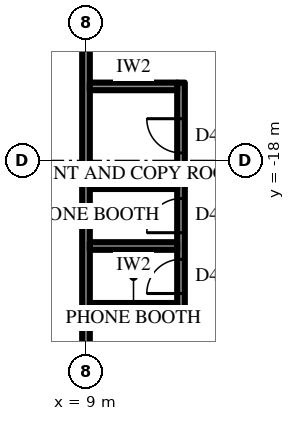
"""IFC4 building model, lengths in metres.
Left out: names, types, materials, properties, quantities, classifications, styles, units other than length and angle.
Written with IfcOpenShell. Run it as: python <this file> out.ifc"""

import sys

from ifc_helpers import new_model, si_unit, direction, frame, frame_2d, origin, place, context, subcontext, project, spatial, rectangle, extrude, element, fill, save


model = new_model("IFC4")
c1 = context("Model", 3, precision=1e-05, world=origin(), true_north=direction((0.0, 1.0)))
c2 = subcontext(c1, "Body", "Model", "MODEL_VIEW")
j1 = project(units=[si_unit("LENGTHUNIT", "METRE"), si_unit("PLANEANGLEUNIT", "RADIAN")], contexts=[c1])
p1 = place(None, origin())
s1 = spatial("IfcSite", under=j1, at=p1, CompositionType="ELEMENT")
p2 = place(p1, origin())
s2 = spatial("IfcBuilding", under=s1, at=p2, CompositionType="ELEMENT")
p3 = place(p2, frame((0.0, 0.0, 161.5)))
s3 = spatial("IfcBuildingStorey", under=s2, at=p3, CompositionType="ELEMENT", Elevation=161.5)
p4 = place(p3, frame((9.0, -12.3, 0.0), z_axis=(0.0, 0.0, 1.0), x_axis=(0.0, -1.0, 0.0)))
e1 = element("IfcWall", 1, at=p4, inside=s3, PredefinedType="PARTITIONING", context=c2, shape_type="SweptSolid", body=[
    extrude(rectangle(XDim=19.0, YDim=0.2, at=frame_2d((9.5, 0.0))), origin(), (0.0, 0.0, 1.0), 4.0),
])
p5 = place(p4, frame((1.4, 0.0, 0.0)))
e2 = element("IfcOpeningElement", 2, at=p5, cuts=e1, PredefinedType="OPENING", context=c2, shape_type="SweptSolid", body=[
    extrude(rectangle(XDim=1.0, YDim=2.2, at=frame_2d((0.5, 1.1))), frame((0.0, 0.11, 0.0), z_axis=(0.0, -1.0, 0.0), x_axis=(1.0, 0.0, 0.0)), (0.0, 0.0, 1.0), 0.22),
])
p6 = place(p3, frame((11.5, -15.95, 0.0), z_axis=(0.0, 0.0, 1.0), x_axis=(0.0, -1.0, 0.0)))
e3 = element("IfcWall", 3, at=p6, inside=s3, PredefinedType="PARTITIONING", context=c2, shape_type="SweptSolid", body=[
    extrude(rectangle(XDim=6.0, YDim=0.2, at=frame_2d((3.0, 0.0))), origin(), (0.0, 0.0, 1.0), 4.0),
])
p7 = place(p6, frame((0.95, 0.0, 0.0)))
e4 = element("IfcOpeningElement", 4, at=p7, cuts=e3, PredefinedType="OPENING", context=c2, shape_type="SweptSolid", body=[
    extrude(rectangle(XDim=0.9, YDim=2.2, at=frame_2d((0.45, 1.1))), frame((0.0, 0.11, 0.0), z_axis=(0.0, -1.0, 0.0), x_axis=(1.0, 0.0, 0.0)), (0.0, 0.0, 1.0), 0.22),
])
p8 = place(p6, frame((3.05, 0.0, 0.0)))
e5 = element("IfcOpeningElement", 5, at=p8, cuts=e3, PredefinedType="OPENING", context=c2, shape_type="SweptSolid", body=[
    extrude(rectangle(XDim=0.9, YDim=2.2, at=frame_2d((0.45, 1.1))), frame((0.0, 0.11, 0.0), z_axis=(0.0, -1.0, 0.0), x_axis=(1.0, 0.0, 0.0)), (0.0, 0.0, 1.0), 0.22),
])
p9 = place(p6, frame((4.65, 0.0, 0.0)))
e6 = element("IfcOpeningElement", 6, at=p9, cuts=e3, PredefinedType="OPENING", context=c2, shape_type="SweptSolid", body=[
    extrude(rectangle(XDim=0.9, YDim=2.2, at=frame_2d((0.45, 1.1))), frame((0.0, 0.11, 0.0), z_axis=(0.0, -1.0, 0.0), x_axis=(1.0, 0.0, 0.0)), (0.0, 0.0, 1.0), 0.22),
])
for number, where, z_axis, x_axis in (
    (7, (9.1, -16.05, 0.0), (0.0, 0.0, 1.0), (1.0, 0.0, 0.0)),
    (8, (9.1, -18.65, 0.0), (0.0, 0.0, 1.0), (1.0, 0.0, 0.0)),
    (9, (9.1, -20.25, 0.0), (0.0, 0.0, 1.0), (1.0, 0.0, 0.0)),
    (10, (9.1, -21.85, 0.0), (0.0, 0.0, 1.0), (1.0, 0.0, 0.0)),
):
    element("IfcWall", number, at=place(p3, frame(where, z_axis=z_axis, x_axis=x_axis)), inside=s3, PredefinedType="PARTITIONING", context=c2, shape_type="SweptSolid", body=[
        extrude(rectangle(XDim=2.3, YDim=0.2, at=frame_2d((1.15, 0.0))), origin(), (0.0, 0.0, 1.0), 4.0),
    ])
p10 = place(p7, frame((0.9, 0.0, 0.0), z_axis=(0.0, 0.0, 1.0), x_axis=(-1.0, 0.0, 0.0)))
e11 = element("IfcDoor", 11, at=p10, inside=s3, OperationType="SINGLE_SWING_LEFT", PredefinedType="DOOR", context=c2, shape_type="SweptSolid", body=[
    extrude(rectangle(XDim=0.9, YDim=2.2, at=frame_2d((0.45, 1.1))), frame((0.0, 0.025, 0.0), z_axis=(0.0, -1.0, 0.0), x_axis=(1.0, 0.0, 0.0)), (0.0, 0.0, 1.0), 0.05),
])
fill(e4, e11)
p11 = place(p8, frame((0.9, 0.0, 0.0), z_axis=(0.0, 0.0, 1.0), x_axis=(-1.0, 0.0, 0.0)))
e12 = element("IfcDoor", 12, at=p11, inside=s3, OperationType="SINGLE_SWING_RIGHT", PredefinedType="DOOR", context=c2, shape_type="SweptSolid", body=[
    extrude(rectangle(XDim=0.9, YDim=2.2, at=frame_2d((0.45, 1.1))), frame((0.0, 0.025, 0.0), z_axis=(0.0, -1.0, 0.0), x_axis=(1.0, 0.0, 0.0)), (0.0, 0.0, 1.0), 0.05),
])
fill(e5, e12)
p12 = place(p9, frame((0.9, 0.0, 0.0), z_axis=(0.0, 0.0, 1.0), x_axis=(-1.0, 0.0, 0.0)))
e13 = element("IfcDoor", 13, at=p12, inside=s3, OperationType="SINGLE_SWING_RIGHT", PredefinedType="DOOR", context=c2, shape_type="SweptSolid", body=[
    extrude(rectangle(XDim=0.9, YDim=2.2, at=frame_2d((0.45, 1.1))), frame((0.0, 0.025, 0.0), z_axis=(0.0, -1.0, 0.0), x_axis=(1.0, 0.0, 0.0)), (0.0, 0.0, 1.0), 0.05),
])
fill(e6, e13)
save(model, sys.argv[1])
